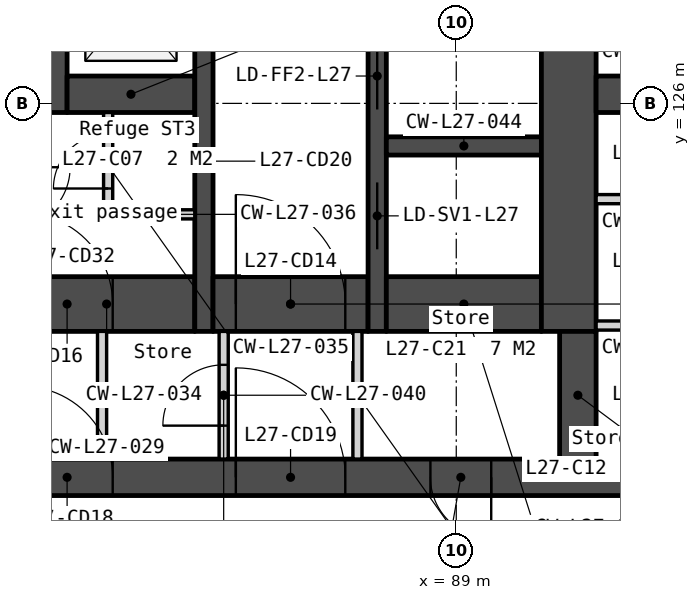
"""IFC4 building model, lengths in metres.
Left out: names, types, materials, properties, quantities, classifications, styles, units other than length and angle.
Written with IfcOpenShell. Run it as: python <this file> out.ifc"""

import sys

from ifc_helpers import new_model, si_unit, direction, frame, frame_2d, origin, place, context, subcontext, project, spatial, polyline, rectangle, outline, extrude, element, fill, save


model = new_model("IFC4")
c1 = context("Model", 3, precision=1e-05, world=origin(), true_north=direction((0.0, 1.0)))
c2 = subcontext(c1, "Body", "Model", "MODEL_VIEW")
j1 = project(units=[si_unit("LENGTHUNIT", "METRE"), si_unit("PLANEANGLEUNIT", "RADIAN")], contexts=[c1])
p1 = place(None, origin())
s1 = spatial("IfcSite", under=j1, at=p1, CompositionType="ELEMENT")
p2 = place(p1, origin())
s2 = spatial("IfcBuilding", under=s1, at=p2, CompositionType="ELEMENT")
p3 = place(p2, frame((0.0, 0.0, 109.8)))
s3 = spatial("IfcBuildingStorey", under=s2, at=p3, CompositionType="ELEMENT", Elevation=109.8)
p4 = place(p3, frame((66.0, 119.85, 0.0), z_axis=(0.0, 0.0, 1.0), x_axis=(1.0, 0.0, 0.0)))
e1 = element("IfcWall", 1, at=p4, inside=s3, PredefinedType="SOLIDWALL", context=c2, shape_type="SweptSolid", body=[
    extrude(rectangle(XDim=28.0, YDim=0.6, at=frame_2d((14.0, 0.0))), origin(), (0.0, 0.0, 1.0), 3.35),
])
p5 = place(p4, frame((6.825, 0.0, 0.0)))
e2 = element("IfcOpeningElement", 2, at=p5, cuts=e1, PredefinedType="OPENING", context=c2, shape_type="SweptSolid", body=[
    extrude(rectangle(XDim=1.8, YDim=2.1, at=frame_2d((0.9, 1.05))), frame((0.0, 0.31, 0.0), z_axis=(0.0, -1.0, 0.0), x_axis=(1.0, 0.0, 0.0)), (0.0, 0.0, 1.0), 0.62),
])
p6 = place(p4, frame((15.85, 0.0, 0.0)))
e3 = element("IfcOpeningElement", 3, at=p6, cuts=e1, PredefinedType="OPENING", context=c2, shape_type="SweptSolid", body=[
    extrude(rectangle(XDim=1.5, YDim=2.1, at=frame_2d((0.75, 1.05))), frame((0.0, 0.31, 0.0), z_axis=(0.0, -1.0, 0.0), x_axis=(1.0, 0.0, 0.0)), (0.0, 0.0, 1.0), 0.62),
])
p7 = place(p4, frame((19.375, 0.0, 0.0)))
e4 = element("IfcOpeningElement", 4, at=p7, cuts=e1, PredefinedType="OPENING", context=c2, shape_type="SweptSolid", body=[
    extrude(rectangle(XDim=1.8, YDim=2.1, at=frame_2d((0.9, 1.05))), frame((0.0, 0.31, 0.0), z_axis=(0.0, -1.0, 0.0), x_axis=(1.0, 0.0, 0.0)), (0.0, 0.0, 1.0), 0.62),
])
p8 = place(p4, frame((4.425, 0.0, 0.0)))
e5 = element("IfcOpeningElement", 5, at=p8, cuts=e1, PredefinedType="OPENING", context=c2, shape_type="SweptSolid", body=[
    extrude(rectangle(XDim=1.0, YDim=2.1, at=frame_2d((0.5, 1.05))), frame((0.0, 0.31, 0.0), z_axis=(0.0, -1.0, 0.0), x_axis=(1.0, 0.0, 0.0)), (0.0, 0.0, 1.0), 0.62),
])
p9 = place(p4, frame((9.783, 0.0, 0.0)))
e6 = element("IfcOpeningElement", 6, at=p9, cuts=e1, PredefinedType="OPENING", context=c2, shape_type="SweptSolid", body=[
    extrude(rectangle(XDim=1.0, YDim=2.1, at=frame_2d((0.5, 1.05))), frame((0.0, 0.31, 0.0), z_axis=(0.0, -1.0, 0.0), x_axis=(1.0, 0.0, 0.0)), (0.0, 0.0, 1.0), 0.62),
])
p10 = place(p4, frame((11.525, 0.0, 0.0)))
e7 = element("IfcOpeningElement", 7, at=p10, cuts=e1, PredefinedType="OPENING", context=c2, shape_type="SweptSolid", body=[
    extrude(rectangle(XDim=1.0, YDim=2.1, at=frame_2d((0.5, 1.05))), frame((0.0, 0.31, 0.0), z_axis=(0.0, -1.0, 0.0), x_axis=(1.0, 0.0, 0.0)), (0.0, 0.0, 1.0), 0.62),
])
p11 = place(p4, frame((13.658, 0.0, 0.0)))
e8 = element("IfcOpeningElement", 8, at=p11, cuts=e1, PredefinedType="OPENING", context=c2, shape_type="SweptSolid", body=[
    extrude(rectangle(XDim=1.0, YDim=2.1, at=frame_2d((0.5, 1.05))), frame((0.0, 0.31, 0.0), z_axis=(0.0, -1.0, 0.0), x_axis=(1.0, 0.0, 0.0)), (0.0, 0.0, 1.0), 0.62),
])
p12 = place(p4, frame((22.575, 0.0, 0.0)))
e9 = element("IfcOpeningElement", 9, at=p12, cuts=e1, PredefinedType="OPENING", context=c2, shape_type="SweptSolid", body=[
    extrude(rectangle(XDim=1.0, YDim=2.1, at=frame_2d((0.5, 1.05))), frame((0.0, 0.31, 0.0), z_axis=(0.0, -1.0, 0.0), x_axis=(1.0, 0.0, 0.0)), (0.0, 0.0, 1.0), 0.62),
])
p13 = place(p3, frame((81.8, 122.7, 0.0), z_axis=(0.0, 0.0, 1.0), x_axis=(1.0, 0.0, 0.0)))
e10 = element("IfcWall", 10, at=p13, inside=s3, PredefinedType="SOLIDWALL", context=c2, shape_type="SweptSolid", body=[
    extrude(rectangle(XDim=2.9, YDim=0.9, at=frame_2d((1.45, 0.0))), origin(), (0.0, 0.0, 1.0), 3.35),
])
p14 = place(p13, frame((0.05, 0.0, 0.0)))
e11 = element("IfcOpeningElement", 11, at=p14, cuts=e10, PredefinedType="OPENING", context=c2, shape_type="SweptSolid", body=[
    extrude(rectangle(XDim=1.5, YDim=2.1, at=frame_2d((0.75, 1.05))), frame((0.0, 0.46, 0.0), z_axis=(0.0, -1.0, 0.0), x_axis=(1.0, 0.0, 0.0)), (0.0, 0.0, 1.0), 0.92),
])
p15 = place(p3, frame((82.45, 133.95, 0.0), z_axis=(0.0, 0.0, 1.0), x_axis=(0.0, -1.0, 0.0)))
e12 = element("IfcWall", 12, at=p15, inside=s3, PredefinedType="SOLIDWALL", context=c2, shape_type="SweptSolid", body=[
    extrude(rectangle(XDim=8.1, YDim=0.3, at=frame_2d((4.05, 0.0))), origin(), (0.0, 0.0, 1.0), 3.35),
])
p16 = place(p15, frame((0.6, 0.0, 0.0)))
e13 = element("IfcOpeningElement", 13, at=p16, cuts=e12, PredefinedType="OPENING", context=c2, shape_type="SweptSolid", body=[
    extrude(rectangle(XDim=1.1, YDim=2.1, at=frame_2d((0.55, 1.05))), frame((0.0, 0.16, 0.0), z_axis=(0.0, -1.0, 0.0), x_axis=(1.0, 0.0, 0.0)), (0.0, 0.0, 1.0), 0.32),
])
p17 = place(p15, frame((3.2, 0.0, 0.0)))
e14 = element("IfcOpeningElement", 14, at=p17, cuts=e12, PredefinedType="OPENING", context=c2, shape_type="SweptSolid", body=[
    extrude(rectangle(XDim=1.1, YDim=2.1, at=frame_2d((0.55, 1.05))), frame((0.0, 0.16, 0.0), z_axis=(0.0, -1.0, 0.0), x_axis=(1.0, 0.0, 0.0)), (0.0, 0.0, 1.0), 0.32),
])
p18 = place(p15, frame((5.8, 0.0, 0.0)))
e15 = element("IfcOpeningElement", 15, at=p18, cuts=e12, PredefinedType="OPENING", context=c2, shape_type="SweptSolid", body=[
    extrude(rectangle(XDim=1.1, YDim=2.1, at=frame_2d((0.55, 1.05))), frame((0.0, 0.16, 0.0), z_axis=(0.0, -1.0, 0.0), x_axis=(1.0, 0.0, 0.0)), (0.0, 0.0, 1.0), 0.32),
])
p19 = place(p3, frame((82.6, 126.15, 0.0), z_axis=(0.0, 0.0, 1.0), x_axis=(1.0, 0.0, 0.0)))
e16 = element("IfcWall", 16, at=p19, inside=s3, PredefinedType="SOLIDWALL", context=c2, shape_type="SweptSolid", body=[
    extrude(rectangle(XDim=2.1, YDim=0.6, at=frame_2d((1.05, 0.0))), origin(), (0.0, 0.0, 1.0), 3.35),
])
p20 = place(p3, frame((83.175, 122.25, 0.0), z_axis=(0.0, 0.0, 1.0), x_axis=(0.0, -1.0, 0.0)))
e17 = element("IfcWall", 17, at=p20, inside=s3, PredefinedType="PARTITIONING", context=c2, shape_type="SweptSolid", body=[
    extrude(rectangle(XDim=2.1, YDim=0.15, at=frame_2d((1.05, 0.0))), origin(), (0.0, 0.0, 1.0), 3.35),
])
p21 = place(p3, frame((83.275, 125.85, 0.0), z_axis=(0.0, 0.0, 1.0), x_axis=(0.0, -1.0, 0.0)))
e18 = element("IfcWall", 18, at=p21, inside=s3, PredefinedType="PARTITIONING", context=c2, shape_type="SweptSolid", body=[
    extrude(rectangle(XDim=1.75, YDim=0.15, at=frame_2d((0.875, 0.0))), origin(), (0.0, 0.0, 1.0), 3.35),
])
p22 = place(p21, frame((0.35, 0.0, 0.0)))
e19 = element("IfcOpeningElement", 19, at=p22, cuts=e18, PredefinedType="OPENING", context=c2, shape_type="SweptSolid", body=[
    extrude(rectangle(XDim=0.9, YDim=2.1, at=frame_2d((0.45, 1.05))), frame((0.0, 0.085, 0.0), z_axis=(0.0, -1.0, 0.0), x_axis=(1.0, 0.0, 0.0)), (0.0, 0.0, 1.0), 0.17),
])
p23 = place(p3, frame((83.35, 124.175, 0.0), z_axis=(0.0, 0.0, 1.0), x_axis=(1.0, 0.0, 0.0)))
e20 = element("IfcWall", 20, at=p23, inside=s3, PredefinedType="PARTITIONING", context=c2, shape_type="SweptSolid", body=[
    extrude(rectangle(XDim=1.35, YDim=0.15, at=frame_2d((0.675, 0.0))), origin(), (0.0, 0.0, 1.0), 3.35),
])
p24 = place(p3, frame((84.85, 133.95, 0.0), z_axis=(0.0, 0.0, 1.0), x_axis=(0.0, -1.0, 0.0)))
e21 = element("IfcWall", 21, at=p24, inside=s3, PredefinedType="SOLIDWALL", context=c2, shape_type="SweptSolid", body=[
    extrude(rectangle(XDim=11.7, YDim=0.3, at=frame_2d((5.85, 0.0))), origin(), (0.0, 0.0, 1.0), 3.35),
])
p25 = place(p3, frame((85.0, 122.7, 0.0), z_axis=(0.0, 0.0, 1.0), x_axis=(1.0, 0.0, 0.0)))
e22 = element("IfcWall", 22, at=p25, inside=s3, PredefinedType="SOLIDWALL", context=c2, shape_type="SweptSolid", body=[
    extrude(rectangle(XDim=2.55, YDim=0.9, at=frame_2d((1.275, 0.0))), origin(), (0.0, 0.0, 1.0), 3.35),
])
p26 = place(p25, frame((0.375, 0.0, 0.0)))
e23 = element("IfcOpeningElement", 23, at=p26, cuts=e22, PredefinedType="OPENING", context=c2, shape_type="SweptSolid", body=[
    extrude(rectangle(XDim=1.8, YDim=2.1, at=frame_2d((0.9, 1.05))), frame((0.0, 0.46, 0.0), z_axis=(0.0, -1.0, 0.0), x_axis=(1.0, 0.0, 0.0)), (0.0, 0.0, 1.0), 0.92),
])
p27 = place(p3, frame((85.175, 122.25, 0.0), z_axis=(0.0, 0.0, 1.0), x_axis=(0.0, -1.0, 0.0)))
e24 = element("IfcWall", 24, at=p27, inside=s3, PredefinedType="PARTITIONING", context=c2, shape_type="SweptSolid", body=[
    extrude(rectangle(XDim=2.1, YDim=0.15, at=frame_2d((1.05, 0.0))), origin(), (0.0, 0.0, 1.0), 3.35),
])
p28 = place(p27, frame((0.55, 0.0, 0.0)))
e25 = element("IfcOpeningElement", 25, at=p28, cuts=e24, PredefinedType="OPENING", context=c2, shape_type="SweptSolid", body=[
    extrude(rectangle(XDim=1.0, YDim=2.1, at=frame_2d((0.5, 1.05))), frame((0.0, 0.085, 0.0), z_axis=(0.0, -1.0, 0.0), x_axis=(1.0, 0.0, 0.0)), (0.0, 0.0, 1.0), 0.17),
])
p29 = place(p3, frame((87.375, 122.25, 0.0), z_axis=(0.0, 0.0, 1.0), x_axis=(0.0, -1.0, 0.0)))
e26 = element("IfcWall", 26, at=p29, inside=s3, PredefinedType="PARTITIONING", context=c2, shape_type="SweptSolid", body=[
    extrude(rectangle(XDim=2.1, YDim=0.15, at=frame_2d((1.05, 0.0))), origin(), (0.0, 0.0, 1.0), 3.35),
])
p30 = place(p3, frame((87.7, 133.95, 0.0), z_axis=(0.0, 0.0, 1.0), x_axis=(0.0, -1.0, 0.0)))
e27 = element("IfcWall", 27, at=p30, inside=s3, PredefinedType="SOLIDWALL", context=c2, shape_type="SweptSolid", body=[
    extrude(rectangle(XDim=11.7, YDim=0.3, at=frame_2d((5.85, 0.0))), origin(), (0.0, 0.0, 1.0), 3.35),
])
p31 = place(p30, frame((6.95, 0.0, 0.0)))
e28 = element("IfcOpeningElement", 28, at=p31, cuts=e27, PredefinedType="OPENING", context=c2, shape_type="SweptSolid", body=[
    extrude(rectangle(XDim=1.1, YDim=2.1, at=frame_2d((0.55, 1.05))), frame((0.0, 0.16, 0.0), z_axis=(0.0, -1.0, 0.0), x_axis=(1.0, 0.0, 0.0)), (0.0, 0.0, 1.0), 0.32),
])
p32 = place(p30, frame((5.1, 0.0, 0.0)))
e29 = element("IfcOpeningElement", 29, at=p32, cuts=e27, PredefinedType="OPENING", context=c2, shape_type="SweptSolid", body=[
    extrude(rectangle(XDim=1.0, YDim=2.1, at=frame_2d((0.5, 1.05))), frame((0.0, 0.16, 0.0), z_axis=(0.0, -1.0, 0.0), x_axis=(1.0, 0.0, 0.0)), (0.0, 0.0, 1.0), 0.32),
])
p33 = place(p30, frame((9.25, 0.0, 0.0)))
e30 = element("IfcOpeningElement", 30, at=p33, cuts=e27, PredefinedType="OPENING", context=c2, shape_type="SweptSolid", body=[
    extrude(rectangle(XDim=1.1, YDim=2.1, at=frame_2d((0.55, 1.05))), frame((0.0, 0.16, 0.0), z_axis=(0.0, -1.0, 0.0), x_axis=(1.0, 0.0, 0.0)), (0.0, 0.0, 1.0), 0.32),
])
p34 = place(p3, frame((87.85, 125.3, 0.0), z_axis=(0.0, 0.0, 1.0), x_axis=(1.0, 0.0, 0.0)))
e31 = element("IfcWall", 31, at=p34, inside=s3, PredefinedType="SOLIDWALL", context=c2, shape_type="SweptSolid", body=[
    extrude(rectangle(XDim=2.55, YDim=0.3, at=frame_2d((1.275, 0.0))), origin(), (0.0, 0.0, 1.0), 3.35),
])
p35 = place(p3, frame((87.85, 122.7, 0.0), z_axis=(0.0, 0.0, 1.0), x_axis=(1.0, 0.0, 0.0)))
e32 = element("IfcWall", 32, at=p35, inside=s3, PredefinedType="SOLIDWALL", context=c2, shape_type="SweptSolid", body=[
    extrude(rectangle(XDim=2.55, YDim=0.9, at=frame_2d((1.275, 0.0))), origin(), (0.0, 0.0, 1.0), 3.35),
])
p36 = place(p3, frame((90.85, 133.95, 0.0), z_axis=(0.0, 0.0, 1.0), x_axis=(0.0, -1.0, 0.0)))
e33 = element("IfcWall", 33, at=p36, inside=s3, PredefinedType="SOLIDWALL", context=c2, shape_type="SweptSolid", body=[
    extrude(rectangle(XDim=11.7, YDim=0.9, at=frame_2d((5.85, 0.0))), origin(), (0.0, 0.0, 1.0), 3.35),
])
p37 = place(p3, frame((91.0, 122.25, 0.0), z_axis=(0.0, 0.0, 1.0), x_axis=(0.0, -1.0, 0.0)))
e34 = element("IfcWall", 34, at=p37, inside=s3, PredefinedType="SOLIDWALL", context=c2, shape_type="SweptSolid", body=[
    extrude(rectangle(XDim=2.1, YDim=0.6, at=frame_2d((1.05, 0.0))), origin(), (0.0, 0.0, 1.0), 3.35),
])
p38 = place(p3, frame((91.3, 126.15, 0.0), z_axis=(0.0, 0.0, 1.0), x_axis=(1.0, 0.0, 0.0)))
e35 = element("IfcWall", 35, at=p38, inside=s3, PredefinedType="SOLIDWALL", context=c2, shape_type="SweptSolid", body=[
    extrude(rectangle(XDim=2.1, YDim=0.6, at=frame_2d((1.05, 0.0))), origin(), (0.0, 0.0, 1.0), 3.35),
])
for number, where, z_axis, x_axis in (
    (36, (91.3, 124.425, 0.0), (0.0, 0.0, 1.0), (1.0, 0.0, 0.0)),
    (37, (91.3, 122.346, 0.0), (0.0, 0.0, 1.0), (1.0, 0.0, 0.0)),
):
    element("IfcWall", number, at=place(p3, frame(where, z_axis=z_axis, x_axis=x_axis)), inside=s3, PredefinedType="PARTITIONING", context=c2, shape_type="SweptSolid", body=[
        extrude(rectangle(XDim=2.1, YDim=0.15, at=frame_2d((1.05, 0.0))), origin(), (0.0, 0.0, 1.0), 3.35),
    ])
p39 = place(p3, frame((82.605, 93.333, -0.15), z_axis=(0.0, 0.0, 1.0), x_axis=(0.500000478905, 0.866025127289, 0.0)))
e38 = element("IfcWall", 38, at=p39, inside=s3, PredefinedType="SOLIDWALL", context=c2, shape_type="SweptSolid", body=[
    extrude(outline(polyline([(42.643, 0.0), (42.643, 3.5), (0.0, 3.5), (0.0, 0.0), (42.643, 0.0)])), frame((0.0, 0.225, 0.0), z_axis=(0.0, -1.0, 0.0), x_axis=(1.0, 0.0, 0.0)), (0.0, 0.0, 1.0), 0.45),
])
p40 = place(p39, frame((2.814, 0.0, 1.05)))
e39 = element("IfcOpeningElement", 39, at=p40, cuts=e38, PredefinedType="OPENING", context=c2, shape_type="SweptSolid", body=[
    extrude(rectangle(XDim=1.2, YDim=1.5, at=frame_2d((0.6, 0.75))), frame((0.0, 0.235, 0.0), z_axis=(0.0, -1.0, 0.0), x_axis=(1.0, 0.0, 0.0)), (0.0, 0.0, 1.0), 0.47),
])
p41 = place(p39, frame((4.514, 0.0, 1.05)))
e40 = element("IfcOpeningElement", 40, at=p41, cuts=e38, PredefinedType="OPENING", context=c2, shape_type="SweptSolid", body=[
    extrude(rectangle(XDim=1.2, YDim=1.5, at=frame_2d((0.6, 0.75))), frame((0.0, 0.235, 0.0), z_axis=(0.0, -1.0, 0.0), x_axis=(1.0, 0.0, 0.0)), (0.0, 0.0, 1.0), 0.47),
])
p42 = place(p39, frame((11.343, 0.0, 1.05)))
e41 = element("IfcOpeningElement", 41, at=p42, cuts=e38, PredefinedType="OPENING", context=c2, shape_type="SweptSolid", body=[
    extrude(rectangle(XDim=1.2, YDim=1.5, at=frame_2d((0.6, 0.75))), frame((0.0, 0.235, 0.0), z_axis=(0.0, -1.0, 0.0), x_axis=(1.0, 0.0, 0.0)), (0.0, 0.0, 1.0), 0.47),
])
p43 = place(p39, frame((13.043, 0.0, 1.05)))
e42 = element("IfcOpeningElement", 42, at=p43, cuts=e38, PredefinedType="OPENING", context=c2, shape_type="SweptSolid", body=[
    extrude(rectangle(XDim=1.2, YDim=1.5, at=frame_2d((0.6, 0.75))), frame((0.0, 0.235, 0.0), z_axis=(0.0, -1.0, 0.0), x_axis=(1.0, 0.0, 0.0)), (0.0, 0.0, 1.0), 0.47),
])
p44 = place(p39, frame((19.872, 0.0, 1.05)))
e43 = element("IfcOpeningElement", 43, at=p44, cuts=e38, PredefinedType="OPENING", context=c2, shape_type="SweptSolid", body=[
    extrude(rectangle(XDim=1.2, YDim=1.5, at=frame_2d((0.6, 0.75))), frame((0.0, 0.235, 0.0), z_axis=(0.0, -1.0, 0.0), x_axis=(1.0, 0.0, 0.0)), (0.0, 0.0, 1.0), 0.47),
])
p45 = place(p39, frame((21.572, 0.0, 1.05)))
e44 = element("IfcOpeningElement", 44, at=p45, cuts=e38, PredefinedType="OPENING", context=c2, shape_type="SweptSolid", body=[
    extrude(rectangle(XDim=1.2, YDim=1.5, at=frame_2d((0.6, 0.75))), frame((0.0, 0.235, 0.0), z_axis=(0.0, -1.0, 0.0), x_axis=(1.0, 0.0, 0.0)), (0.0, 0.0, 1.0), 0.47),
])
p46 = place(p39, frame((28.4, 0.0, 1.05)))
e45 = element("IfcOpeningElement", 45, at=p46, cuts=e38, PredefinedType="OPENING", context=c2, shape_type="SweptSolid", body=[
    extrude(rectangle(XDim=1.2, YDim=1.5, at=frame_2d((0.6, 0.75))), frame((0.0, 0.235, 0.0), z_axis=(0.0, -1.0, 0.0), x_axis=(1.0, 0.0, 0.0)), (0.0, 0.0, 1.0), 0.47),
])
p47 = place(p39, frame((30.1, 0.0, 1.05)))
e46 = element("IfcOpeningElement", 46, at=p47, cuts=e38, PredefinedType="OPENING", context=c2, shape_type="SweptSolid", body=[
    extrude(rectangle(XDim=1.2, YDim=1.5, at=frame_2d((0.6, 0.75))), frame((0.0, 0.235, 0.0), z_axis=(0.0, -1.0, 0.0), x_axis=(1.0, 0.0, 0.0)), (0.0, 0.0, 1.0), 0.47),
])
p48 = place(p39, frame((36.929, 0.0, 1.05)))
e47 = element("IfcOpeningElement", 47, at=p48, cuts=e38, PredefinedType="OPENING", context=c2, shape_type="SweptSolid", body=[
    extrude(rectangle(XDim=1.2, YDim=1.5, at=frame_2d((0.6, 0.75))), frame((0.0, 0.235, 0.0), z_axis=(0.0, -1.0, 0.0), x_axis=(1.0, 0.0, 0.0)), (0.0, 0.0, 1.0), 0.47),
])
p49 = place(p39, frame((38.629, 0.0, 1.05)))
e48 = element("IfcOpeningElement", 48, at=p49, cuts=e38, PredefinedType="OPENING", context=c2, shape_type="SweptSolid", body=[
    extrude(rectangle(XDim=1.2, YDim=1.5, at=frame_2d((0.6, 0.75))), frame((0.0, 0.235, 0.0), z_axis=(0.0, -1.0, 0.0), x_axis=(1.0, 0.0, 0.0)), (0.0, 0.0, 1.0), 0.47),
])
p50 = place(p31, origin())
e49 = element("IfcDoor", 49, at=p50, inside=s3, OperationType="SLIDING_TO_LEFT", PredefinedType="DOOR", context=c2, shape_type="SweptSolid", body=[
    extrude(rectangle(XDim=1.1, YDim=2.1, at=frame_2d((0.55, 1.05))), frame((0.0, 0.025, 0.0), z_axis=(0.0, -1.0, 0.0), x_axis=(1.0, 0.0, 0.0)), (0.0, 0.0, 1.0), 0.05),
])
fill(e28, e49)
p51 = place(p26, origin())
e50 = element("IfcDoor", 50, at=p51, inside=s3, OperationType="DOUBLE_DOOR_DOUBLE_SWING", PredefinedType="DOOR", context=c2, shape_type="SweptSolid", body=[
    extrude(rectangle(XDim=1.8, YDim=2.1, at=frame_2d((0.9, 1.05))), frame((0.0, 0.025, 0.0), z_axis=(0.0, -1.0, 0.0), x_axis=(1.0, 0.0, 0.0)), (0.0, 0.0, 1.0), 0.05),
])
fill(e23, e50)
p52 = place(p14, origin())
e51 = element("IfcDoor", 51, at=p52, inside=s3, OperationType="DOUBLE_DOOR_DOUBLE_SWING", PredefinedType="DOOR", context=c2, shape_type="SweptSolid", body=[
    extrude(rectangle(XDim=1.5, YDim=2.1, at=frame_2d((0.75, 1.05))), frame((0.0, 0.025, 0.0), z_axis=(0.0, -1.0, 0.0), x_axis=(1.0, 0.0, 0.0)), (0.0, 0.0, 1.0), 0.05),
])
fill(e11, e51)
p53 = place(p6, origin())
e52 = element("IfcDoor", 52, at=p53, inside=s3, OperationType="DOUBLE_DOOR_DOUBLE_SWING", PredefinedType="DOOR", context=c2, shape_type="SweptSolid", body=[
    extrude(rectangle(XDim=1.5, YDim=2.1, at=frame_2d((0.75, 1.05))), frame((0.0, 0.025, 0.0), z_axis=(0.0, -1.0, 0.0), x_axis=(1.0, 0.0, 0.0)), (0.0, 0.0, 1.0), 0.05),
])
fill(e3, e52)
p54 = place(p7, origin())
e53 = element("IfcDoor", 53, at=p54, inside=s3, OperationType="DOUBLE_DOOR_DOUBLE_SWING", PredefinedType="DOOR", context=c2, shape_type="SweptSolid", body=[
    extrude(rectangle(XDim=1.8, YDim=2.1, at=frame_2d((0.9, 1.05))), frame((0.0, 0.025, 0.0), z_axis=(0.0, -1.0, 0.0), x_axis=(1.0, 0.0, 0.0)), (0.0, 0.0, 1.0), 0.05),
])
fill(e4, e53)
p55 = place(p22, origin())
e54 = element("IfcDoor", 54, at=p55, inside=s3, OperationType="SINGLE_SWING_RIGHT", PredefinedType="DOOR", context=c2, shape_type="SweptSolid", body=[
    extrude(rectangle(XDim=0.9, YDim=2.1, at=frame_2d((0.45, 1.05))), frame((0.0, 0.025, 0.0), z_axis=(0.0, -1.0, 0.0), x_axis=(1.0, 0.0, 0.0)), (0.0, 0.0, 1.0), 0.05),
])
fill(e19, e54)
p56 = place(p28, origin())
e55 = element("IfcDoor", 55, at=p56, inside=s3, OperationType="SINGLE_SWING_RIGHT", PredefinedType="DOOR", context=c2, shape_type="SweptSolid", body=[
    extrude(rectangle(XDim=1.0, YDim=2.1, at=frame_2d((0.5, 1.05))), frame((0.0, 0.025, 0.0), z_axis=(0.0, -1.0, 0.0), x_axis=(1.0, 0.0, 0.0)), (0.0, 0.0, 1.0), 0.05),
])
fill(e25, e55)
p57 = place(p12, origin())
e56 = element("IfcDoor", 56, at=p57, inside=s3, OperationType="SINGLE_SWING_RIGHT", PredefinedType="DOOR", context=c2, shape_type="SweptSolid", body=[
    extrude(rectangle(XDim=1.0, YDim=2.1, at=frame_2d((0.5, 1.05))), frame((0.0, 0.025, 0.0), z_axis=(0.0, -1.0, 0.0), x_axis=(1.0, 0.0, 0.0)), (0.0, 0.0, 1.0), 0.05),
])
fill(e9, e56)
p58 = place(p33, origin())
e57 = element("IfcDoor", 57, at=p58, inside=s3, OperationType="SLIDING_TO_LEFT", PredefinedType="DOOR", context=c2, shape_type="SweptSolid", body=[
    extrude(rectangle(XDim=1.1, YDim=2.1, at=frame_2d((0.55, 1.05))), frame((0.0, 0.025, 0.0), z_axis=(0.0, -1.0, 0.0), x_axis=(1.0, 0.0, 0.0)), (0.0, 0.0, 1.0), 0.05),
])
fill(e30, e57)
save(model, sys.argv[1])
